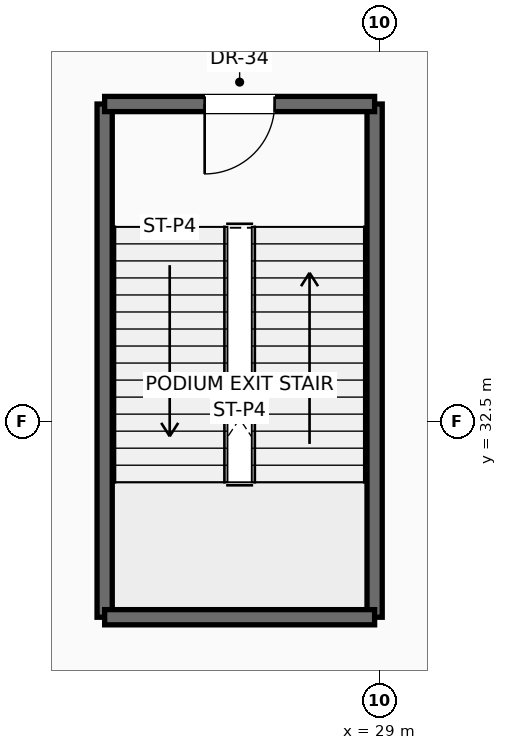
"""IFC4 building model, lengths in metres.
Left out: names, types, materials, properties, quantities, classifications, styles, units other than length and angle.
Written with IfcOpenShell. Run it as: python <this file> out.ifc"""

import sys

from ifc_helpers import new_model, si_unit, direction, frame, frame_2d, origin, place, context, subcontext, project, spatial, rectangle, extrude, source, transform, mapped, element, fill, save


model = new_model("IFC4")
c1 = context("Model", 3, precision=1e-05, world=origin(), true_north=direction((0.0, 1.0)))
c2 = subcontext(c1, "Body", "Model", "MODEL_VIEW")
j1 = project(units=[si_unit("LENGTHUNIT", "METRE"), si_unit("PLANEANGLEUNIT", "RADIAN")], contexts=[c1])
p1 = place(None, origin())
s1 = spatial("IfcSite", under=j1, at=p1, CompositionType="ELEMENT")
p2 = place(p1, origin())
s2 = spatial("IfcBuilding", under=s1, at=p2, CompositionType="ELEMENT")
p3 = place(p2, frame((0.0, 0.0, 5.5)))
s3 = spatial("IfcBuildingStorey", under=s2, at=p3, CompositionType="ELEMENT", Elevation=5.5)
for number, where, z_axis, x_axis in (
    (1, (24.48, 29.28, 0.0), (0.0, 0.0, 1.0), (0.0, 1.0, 0.0)),
    (2, (28.92, 29.28, 0.0), (0.0, 0.0, 1.0), (0.0, 1.0, 0.0)),
):
    element("IfcWall", number, at=place(p3, frame(where, z_axis=z_axis, x_axis=x_axis)), inside=s3, PredefinedType="SOLIDWALL", context=c2, shape_type="SweptSolid", body=[
        extrude(rectangle(XDim=8.44, YDim=0.25, at=frame_2d((4.22, 0.0))), origin(), (0.0, 0.0, 1.0), 5.17),
    ])
p4 = place(p3, frame((24.48, 29.28, 0.0), z_axis=(0.0, 0.0, 1.0), x_axis=(1.0, 0.0, 0.0)))
e3 = element("IfcWall", 3, at=p4, inside=s3, PredefinedType="SOLIDWALL", context=c2, shape_type="SweptSolid", body=[
    extrude(rectangle(XDim=4.44, YDim=0.25, at=frame_2d((2.22, 0.0))), origin(), (0.0, 0.0, 1.0), 5.17),
])
p5 = place(p3, frame((28.92, 37.72, 0.0), z_axis=(0.0, 0.0, 1.0), x_axis=(-1.0, 0.0, 0.0)))
e4 = element("IfcWall", 4, at=p5, inside=s3, PredefinedType="SOLIDWALL", context=c2, shape_type="SweptSolid", body=[
    extrude(rectangle(XDim=4.44, YDim=0.25, at=frame_2d((2.22, 0.0))), origin(), (0.0, 0.0, 1.0), 5.17),
])
p6 = place(p5, frame((1.645, 0.0, 0.0)))
e5 = element("IfcOpeningElement", 5, at=p6, cuts=e4, PredefinedType="OPENING", context=c2, shape_type="SweptSolid", body=[
    extrude(rectangle(XDim=1.15, YDim=2.2, at=frame_2d((0.575, 1.1))), frame((0.0, 0.135, 0.0), z_axis=(0.0, -1.0, 0.0), x_axis=(1.0, 0.0, 0.0)), (0.0, 0.0, 1.0), 0.27),
])
m1 = source(origin(), c2, "Body", "SweptSolid", [
    extrude(rectangle(XDim=1.15, YDim=2.2, at=frame_2d((0.575, 1.1))), frame((0.0, 0.025, 0.0), z_axis=(0.0, -1.0, 0.0), x_axis=(1.0, 0.0, 0.0)), (0.0, 0.0, 1.0), 0.05),
])
p7 = place(p6, origin())
e6 = element("IfcDoor", 6, at=p7, inside=s3, OperationType="SINGLE_SWING_RIGHT", PredefinedType="DOOR", context=c2, shape_type="MappedRepresentation", body=[
    mapped(m1, transform((0.0, 0.0, 0.0), scale=1.0)),
])
fill(e5, e6)
save(model, sys.argv[1])
